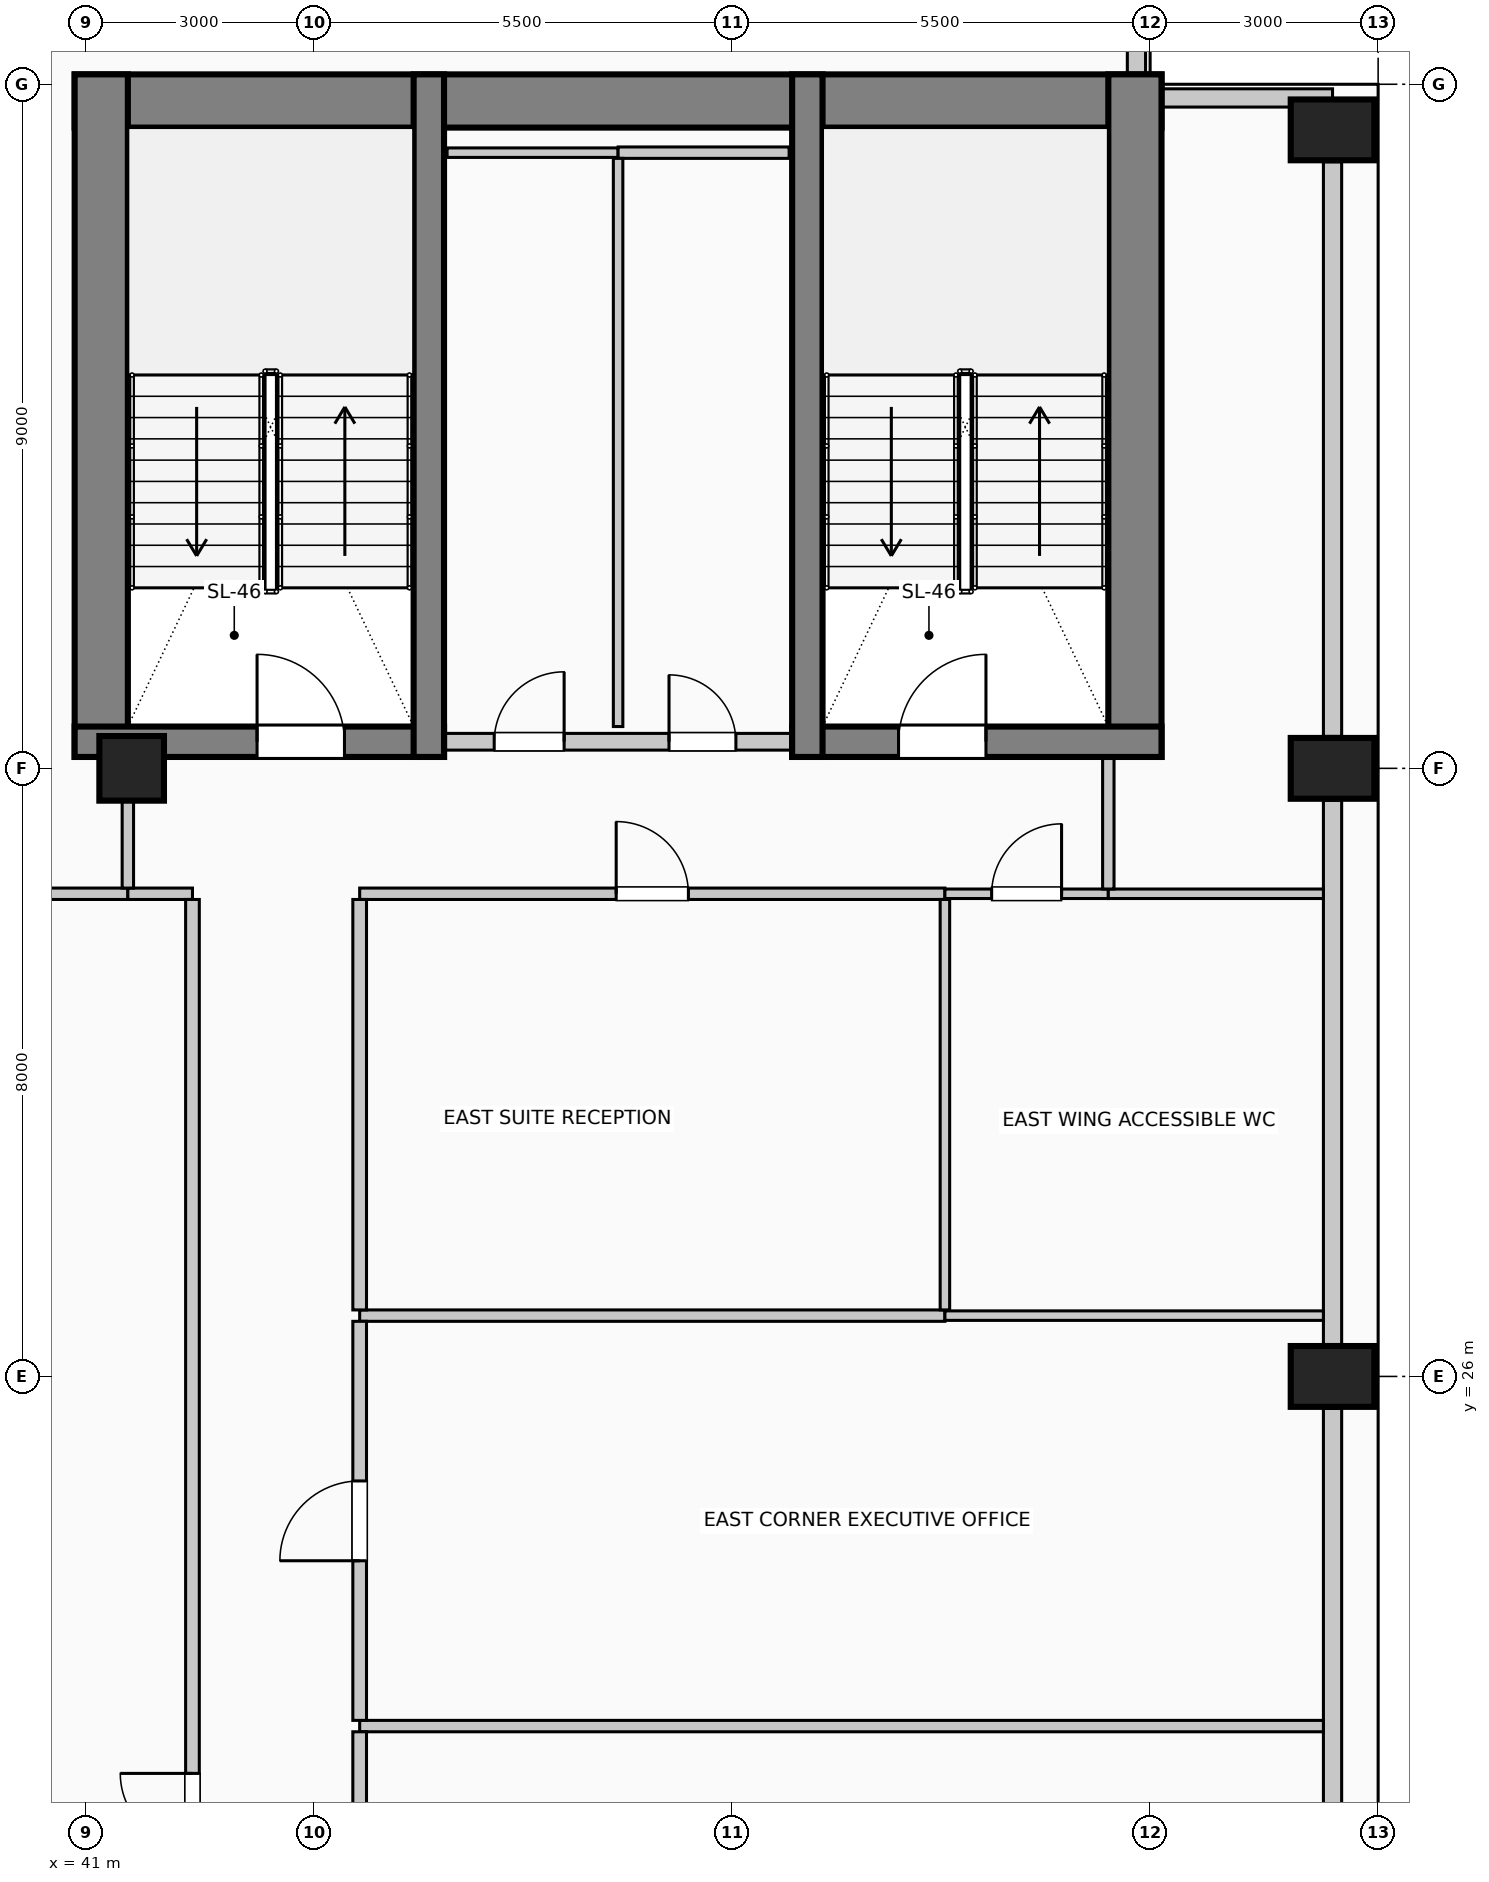
"""IFC4 building model, lengths in metres.
Left out: names, types, materials, properties, quantities, classifications, styles, units other than length and angle.
Written with IfcOpenShell. Run it as: python <this file> out.ifc"""

import sys

from ifc_helpers import new_model, si_unit, direction, frame, frame_2d, origin, origin_2d, place, context, subcontext, project, spatial, rectangle, circle, extrude, element, fill, save


model = new_model("IFC4")
c1 = context("Model", 3, precision=1e-05, world=origin(), true_north=direction((0.0, 1.0)))
c2 = subcontext(c1, "Body", "Model", "MODEL_VIEW")
j1 = project(units=[si_unit("LENGTHUNIT", "METRE"), si_unit("PLANEANGLEUNIT", "RADIAN")], contexts=[c1])
p1 = place(None, origin())
s1 = spatial("IfcSite", under=j1, at=p1, CompositionType="ELEMENT")
p2 = place(p1, origin())
s2 = spatial("IfcBuilding", under=s1, at=p2, CompositionType="ELEMENT")
p3 = place(p2, frame((0.0, 0.0, 186.6)))
s3 = spatial("IfcBuildingStorey", under=s2, at=p3, CompositionType="ELEMENT", Elevation=186.6)
p4 = place(p3, frame((40.85, 42.78, 0.0), z_axis=(0.0, 0.0, 1.0), x_axis=(1.0, 0.0, 0.0)))
e1 = element("IfcWall", 1, at=p4, inside=s3, PredefinedType="SHEAR", context=c2, shape_type="SweptSolid", body=[
    extrude(rectangle(XDim=14.3, YDim=0.7, at=frame_2d((7.15, 0.0))), origin(), (0.0, 0.0, 1.0), 4.0),
])
for number, where, z_axis, x_axis in (
    (2, (41.2, 34.15, 0.0), (0.0, 0.0, 1.0), (0.0, 1.0, 0.0)),
    (3, (54.8, 34.15, 0.0), (0.0, 0.0, 1.0), (0.0, 1.0, 0.0)),
):
    element("IfcWall", number, at=place(p3, frame(where, z_axis=z_axis, x_axis=x_axis)), inside=s3, PredefinedType="SHEAR", context=c2, shape_type="SweptSolid", body=[
        extrude(rectangle(XDim=8.98, YDim=0.7, at=frame_2d((4.49, 0.0))), origin(), (0.0, 0.0, 1.0), 4.0),
    ])
p5 = place(p3, frame((40.85, 34.35, 0.0), z_axis=(0.0, 0.0, 1.0), x_axis=(1.0, 0.0, 0.0)))
e4 = element("IfcWall", 4, at=p5, inside=s3, PredefinedType="SHEAR", context=c2, shape_type="SweptSolid", body=[
    extrude(rectangle(XDim=4.86, YDim=0.4, at=frame_2d((2.43, 0.0))), origin(), (0.0, 0.0, 1.0), 4.0),
])
p6 = place(p5, frame((2.4, 0.0, 0.0)))
e5 = element("IfcOpeningElement", 5, at=p6, cuts=e4, PredefinedType="OPENING", context=c2, shape_type="SweptSolid", body=[
    extrude(rectangle(XDim=1.15, YDim=2.2, at=frame_2d((0.575, 1.1))), frame((0.0, 0.21, 0.0), z_axis=(0.0, -1.0, 0.0), x_axis=(1.0, 0.0, 0.0)), (0.0, 0.0, 1.0), 0.42),
])
p7 = place(p3, frame((45.51, 34.15, 0.0), z_axis=(0.0, 0.0, 1.0), x_axis=(0.0, 1.0, 0.0)))
e6 = element("IfcWall", 6, at=p7, inside=s3, PredefinedType="SHEAR", context=c2, shape_type="SweptSolid", body=[
    extrude(rectangle(XDim=8.98, YDim=0.4, at=frame_2d((4.49, 0.0))), origin(), (0.0, 0.0, 1.0), 4.0),
])
p8 = place(p3, frame((50.29, 34.35, 0.0), z_axis=(0.0, 0.0, 1.0), x_axis=(1.0, 0.0, 0.0)))
e7 = element("IfcWall", 7, at=p8, inside=s3, PredefinedType="SHEAR", context=c2, shape_type="SweptSolid", body=[
    extrude(rectangle(XDim=4.86, YDim=0.4, at=frame_2d((2.43, 0.0))), origin(), (0.0, 0.0, 1.0), 4.0),
])
p9 = place(p8, frame((1.4, 0.0, 0.0)))
e8 = element("IfcOpeningElement", 8, at=p9, cuts=e7, PredefinedType="OPENING", context=c2, shape_type="SweptSolid", body=[
    extrude(rectangle(XDim=1.15, YDim=2.2, at=frame_2d((0.575, 1.1))), frame((0.0, 0.21, 0.0), z_axis=(0.0, -1.0, 0.0), x_axis=(1.0, 0.0, 0.0)), (0.0, 0.0, 1.0), 0.42),
])
p10 = place(p3, frame((50.49, 34.15, 0.0), z_axis=(0.0, 0.0, 1.0), x_axis=(0.0, 1.0, 0.0)))
e9 = element("IfcWall", 9, at=p10, inside=s3, PredefinedType="SHEAR", context=c2, shape_type="SweptSolid", body=[
    extrude(rectangle(XDim=8.98, YDim=0.4, at=frame_2d((4.49, 0.0))), origin(), (0.0, 0.0, 1.0), 4.0),
])
for number, where, z_axis, x_axis in (
    (10, (57.4, 26.0, 0.0), (0.0, 0.0, 1.0), (0.0, 1.0, 0.0)),
    (11, (57.4, 34.0, 0.0), (0.0, 0.0, 1.0), (0.0, 1.0, 0.0)),
    (12, (57.4, 42.4, 0.0), (0.0, 0.0, 1.0), (0.0, 1.0, 0.0)),
):
    element("IfcColumn", number, at=place(p3, frame(where, z_axis=z_axis, x_axis=x_axis)), inside=s3, PredefinedType="COLUMN", context=c2, shape_type="SweptSolid", body=[
        extrude(rectangle(XDim=0.8, YDim=1.1, at=origin_2d()), origin(), (0.0, 0.0, 1.0), 4.0),
    ])
p11 = place(p3, frame((41.6, 34.0, 0.0), z_axis=(0.0, 0.0, 1.0), x_axis=(1.0, 0.0, 0.0)))
e13 = element("IfcColumn", 13, at=p11, inside=s3, PredefinedType="COLUMN", context=c2, shape_type="SweptSolid", body=[
    extrude(circle(Radius=0.425, at=origin_2d()), origin(), (0.0, 0.0, 1.0), 4.0),
])
for number, where, z_axis, x_axis in (
    (14, (57.4, 25.58, 0.0), (0.0, 0.0, 1.0), (0.0, -1.0, 0.0)),
    (15, (57.4, 33.58, 0.0), (0.0, 0.0, 1.0), (0.0, -1.0, 0.0)),
):
    element("IfcWall", number, at=place(p3, frame(where, z_axis=z_axis, x_axis=x_axis)), inside=s3, PredefinedType="SOLIDWALL", context=c2, shape_type="SweptSolid", body=[
        extrude(rectangle(XDim=7.16, YDim=0.24, at=frame_2d((3.58, 0.0))), origin(), (0.0, 0.0, 1.0), 3.0),
    ])
p12 = place(p3, frame((57.4, 41.98, 0.0), z_axis=(0.0, 0.0, 1.0), x_axis=(0.0, -1.0, 0.0)))
e16 = element("IfcWall", 16, at=p12, inside=s3, PredefinedType="SOLIDWALL", context=c2, shape_type="SweptSolid", body=[
    extrude(rectangle(XDim=7.56, YDim=0.24, at=frame_2d((3.78, 0.0))), origin(), (0.0, 0.0, 1.0), 3.0),
])
p13 = place(p3, frame((54.82, 45.4, 0.0), z_axis=(0.0, 0.0, 1.0), x_axis=(0.0, -1.0, 0.0)))
e17 = element("IfcWall", 17, at=p13, inside=s3, PredefinedType="SOLIDWALL", context=c2, shape_type="SweptSolid", body=[
    extrude(rectangle(XDim=2.265, YDim=0.24, at=frame_2d((1.132, 0.0))), origin(), (0.0, 0.0, 1.0), 3.75),
])
p14 = place(p3, frame((55.155, 42.82, 0.0), z_axis=(0.0, 0.0, 1.0), x_axis=(1.0, 0.0, 0.0)))
e18 = element("IfcWall", 18, at=p14, inside=s3, PredefinedType="SOLIDWALL", context=c2, shape_type="SweptSolid", body=[
    extrude(rectangle(XDim=2.245, YDim=0.24, at=frame_2d((1.123, 0.0))), origin(), (0.0, 0.0, 1.0), 3.75),
])
p15 = place(p3, frame((45.72, 34.35, 0.0), z_axis=(0.0, 0.0, 1.0), x_axis=(1.0, 0.0, 0.0)))
e19 = element("IfcWall", 19, at=p15, inside=s3, PredefinedType="PARTITIONING", context=c2, shape_type="SweptSolid", body=[
    extrude(rectangle(XDim=4.56, YDim=0.22, at=frame_2d((2.28, 0.0))), origin(), (0.0, 0.0, 1.0), 3.75),
])
p16 = place(p15, frame((0.65, 0.0, 0.0)))
e20 = element("IfcOpeningElement", 20, at=p16, cuts=e19, PredefinedType="OPENING", context=c2, shape_type="SweptSolid", body=[
    extrude(rectangle(XDim=0.92, YDim=2.1, at=frame_2d((0.46, 1.05))), frame((0.0, 0.12, 0.0), z_axis=(0.0, -1.0, 0.0), x_axis=(1.0, 0.0, 0.0)), (0.0, 0.0, 1.0), 0.24),
])
p17 = place(p15, frame((2.95, 0.0, 0.0)))
e21 = element("IfcOpeningElement", 21, at=p17, cuts=e19, PredefinedType="OPENING", context=c2, shape_type="SweptSolid", body=[
    extrude(rectangle(XDim=0.88, YDim=2.1, at=frame_2d((0.44, 1.05))), frame((0.0, 0.12, 0.0), z_axis=(0.0, -1.0, 0.0), x_axis=(1.0, 0.0, 0.0)), (0.0, 0.0, 1.0), 0.24),
])
p18 = place(p3, frame((44.6, 21.4, 0.0), z_axis=(0.0, 0.0, 1.0), x_axis=(1.0, 0.0, 0.0)))
e22 = element("IfcWall", 22, at=p18, inside=s3, PredefinedType="PARTITIONING", context=c2, shape_type="SweptSolid", body=[
    extrude(rectangle(XDim=12.68, YDim=0.15, at=frame_2d((6.34, 0.0))), origin(), (0.0, 0.0, 1.0), 3.75),
])
p19 = place(p3, frame((44.6, 26.8, 0.0), z_axis=(0.0, 0.0, 1.0), x_axis=(1.0, 0.0, 0.0)))
e23 = element("IfcWall", 23, at=p19, inside=s3, PredefinedType="PARTITIONING", context=c2, shape_type="SweptSolid", body=[
    extrude(rectangle(XDim=7.7, YDim=0.15, at=frame_2d((3.85, 0.0))), origin(), (0.0, 0.0, 1.0), 3.75),
])
p20 = place(p3, frame((52.3, 26.8, 0.0), z_axis=(0.0, 0.0, 1.0), x_axis=(1.0, 0.0, 0.0)))
e24 = element("IfcWall", 24, at=p20, inside=s3, PredefinedType="PARTITIONING", context=c2, shape_type="SweptSolid", body=[
    extrude(rectangle(XDim=4.98, YDim=0.125, at=frame_2d((2.49, 0.0))), origin(), (0.0, 0.0, 1.0), 3.75),
])
p21 = place(p3, frame((34.12, 32.35, 0.0), z_axis=(0.0, 0.0, 1.0), x_axis=(1.0, 0.0, 0.0)))
e25 = element("IfcWall", 25, at=p21, inside=s3, PredefinedType="PARTITIONING", context=c2, shape_type="SweptSolid", body=[
    extrude(rectangle(XDim=7.43, YDim=0.15, at=frame_2d((3.715, 0.0))), origin(), (0.0, 0.0, 1.0), 3.75),
])
p22 = place(p3, frame((41.55, 32.35, 0.0), z_axis=(0.0, 0.0, 1.0), x_axis=(1.0, 0.0, 0.0)))
e26 = element("IfcWall", 26, at=p22, inside=s3, PredefinedType="PARTITIONING", context=c2, shape_type="SweptSolid", body=[
    extrude(rectangle(XDim=0.85, YDim=0.15, at=frame_2d((0.425, 0.0))), origin(), (0.0, 0.0, 1.0), 3.75),
])
p23 = place(p3, frame((44.6, 32.35, 0.0), z_axis=(0.0, 0.0, 1.0), x_axis=(1.0, 0.0, 0.0)))
e27 = element("IfcWall", 27, at=p23, inside=s3, PredefinedType="PARTITIONING", context=c2, shape_type="SweptSolid", body=[
    extrude(rectangle(XDim=7.7, YDim=0.15, at=frame_2d((3.85, 0.0))), origin(), (0.0, 0.0, 1.0), 3.75),
])
p24 = place(p23, frame((3.375, 0.0, 0.0)))
e28 = element("IfcOpeningElement", 28, at=p24, cuts=e27, PredefinedType="OPENING", context=c2, shape_type="SweptSolid", body=[
    extrude(rectangle(XDim=0.95, YDim=2.15, at=frame_2d((0.475, 1.075))), frame((0.0, 0.085, 0.0), z_axis=(0.0, -1.0, 0.0), x_axis=(1.0, 0.0, 0.0)), (0.0, 0.0, 1.0), 0.17),
])
p25 = place(p3, frame((52.3, 32.35, 0.0), z_axis=(0.0, 0.0, 1.0), x_axis=(1.0, 0.0, 0.0)))
e29 = element("IfcWall", 29, at=p25, inside=s3, PredefinedType="PARTITIONING", context=c2, shape_type="SweptSolid", body=[
    extrude(rectangle(XDim=2.15, YDim=0.125, at=frame_2d((1.075, 0.0))), origin(), (0.0, 0.0, 1.0), 3.75),
])
p26 = place(p25, frame((0.615, 0.0, 0.0)))
e30 = element("IfcOpeningElement", 30, at=p26, cuts=e29, PredefinedType="OPENING", context=c2, shape_type="SweptSolid", body=[
    extrude(rectangle(XDim=0.92, YDim=2.1, at=frame_2d((0.46, 1.05))), frame((0.0, 0.073, 0.0), z_axis=(0.0, -1.0, 0.0), x_axis=(1.0, 0.0, 0.0)), (0.0, 0.0, 1.0), 0.145),
])
p27 = place(p3, frame((54.45, 32.35, 0.0), z_axis=(0.0, 0.0, 1.0), x_axis=(1.0, 0.0, 0.0)))
e31 = element("IfcWall", 31, at=p27, inside=s3, PredefinedType="PARTITIONING", context=c2, shape_type="SweptSolid", body=[
    extrude(rectangle(XDim=2.83, YDim=0.125, at=frame_2d((1.415, 0.0))), origin(), (0.0, 0.0, 1.0), 3.75),
])
p28 = place(p3, frame((45.75, 42.1, 0.0), z_axis=(0.0, 0.0, 1.0), x_axis=(1.0, 0.0, 0.0)))
e32 = element("IfcWall", 32, at=p28, inside=s3, PredefinedType="PARTITIONING", context=c2, shape_type="SweptSolid", body=[
    extrude(rectangle(XDim=2.25, YDim=0.125, at=frame_2d((1.125, 0.0))), origin(), (0.0, 0.0, 1.0), 3.75),
])
p29 = place(p3, frame((48.0, 42.1, 0.0), z_axis=(0.0, 0.0, 1.0), x_axis=(1.0, 0.0, 0.0)))
e33 = element("IfcWall", 33, at=p29, inside=s3, PredefinedType="PARTITIONING", context=c2, shape_type="SweptSolid", body=[
    extrude(rectangle(XDim=2.25, YDim=0.15, at=frame_2d((1.125, 0.0))), origin(), (0.0, 0.0, 1.0), 3.75),
])
p30 = place(p3, frame((41.55, 32.425, 0.0), z_axis=(0.0, 0.0, 1.0), x_axis=(0.0, 1.0, 0.0)))
e34 = element("IfcWall", 34, at=p30, inside=s3, PredefinedType="PARTITIONING", context=c2, shape_type="SweptSolid", body=[
    extrude(rectangle(XDim=1.15, YDim=0.15, at=frame_2d((0.575, 0.0))), origin(), (0.0, 0.0, 1.0), 3.145),
])
p31 = place(p3, frame((42.4, 6.89, 0.0), z_axis=(0.0, 0.0, 1.0), x_axis=(0.0, 1.0, 0.0)))
e35 = element("IfcWall", 35, at=p31, inside=s3, PredefinedType="PARTITIONING", context=c2, shape_type="SweptSolid", body=[
    extrude(rectangle(XDim=25.385, YDim=0.18, at=frame_2d((12.692, 0.0))), origin(), (0.0, 0.0, 1.0), 3.75),
])
p32 = place(p31, frame((12.938, 0.0, 0.0)))
e36 = element("IfcOpeningElement", 36, at=p32, cuts=e35, PredefinedType="OPENING", context=c2, shape_type="SweptSolid", body=[
    extrude(rectangle(XDim=0.95, YDim=2.15, at=frame_2d((0.475, 1.075))), frame((0.0, 0.1, 0.0), z_axis=(0.0, -1.0, 0.0), x_axis=(1.0, 0.0, 0.0)), (0.0, 0.0, 1.0), 0.2),
])
p33 = place(p3, frame((44.6, 16.075, 0.0), z_axis=(0.0, 0.0, 1.0), x_axis=(0.0, 1.0, 0.0)))
e37 = element("IfcWall", 37, at=p33, inside=s3, PredefinedType="PARTITIONING", context=c2, shape_type="SweptSolid", body=[
    extrude(rectangle(XDim=5.25, YDim=0.18, at=frame_2d((2.625, 0.0))), origin(), (0.0, 0.0, 1.0), 3.75),
])
p34 = place(p33, frame((2.15, 0.0, 0.0)))
e38 = element("IfcOpeningElement", 38, at=p34, cuts=e37, PredefinedType="OPENING", context=c2, shape_type="SweptSolid", body=[
    extrude(rectangle(XDim=0.95, YDim=2.15, at=frame_2d((0.475, 1.075))), frame((0.0, 0.1, 0.0), z_axis=(0.0, -1.0, 0.0), x_axis=(1.0, 0.0, 0.0)), (0.0, 0.0, 1.0), 0.2),
])
p35 = place(p3, frame((44.6, 21.475, 0.0), z_axis=(0.0, 0.0, 1.0), x_axis=(0.0, 1.0, 0.0)))
e39 = element("IfcWall", 39, at=p35, inside=s3, PredefinedType="PARTITIONING", context=c2, shape_type="SweptSolid", body=[
    extrude(rectangle(XDim=5.25, YDim=0.18, at=frame_2d((2.625, 0.0))), origin(), (0.0, 0.0, 1.0), 3.75),
])
p36 = place(p35, frame((2.1, 0.0, 0.0)))
e40 = element("IfcOpeningElement", 40, at=p36, cuts=e39, PredefinedType="OPENING", context=c2, shape_type="SweptSolid", body=[
    extrude(rectangle(XDim=1.05, YDim=2.15, at=frame_2d((0.525, 1.075))), frame((0.0, 0.1, 0.0), z_axis=(0.0, -1.0, 0.0), x_axis=(1.0, 0.0, 0.0)), (0.0, 0.0, 1.0), 0.2),
])
p37 = place(p3, frame((44.6, 26.875, 0.0), z_axis=(0.0, 0.0, 1.0), x_axis=(0.0, 1.0, 0.0)))
e41 = element("IfcWall", 41, at=p37, inside=s3, PredefinedType="PARTITIONING", context=c2, shape_type="SweptSolid", body=[
    extrude(rectangle(XDim=5.4, YDim=0.18, at=frame_2d((2.7, 0.0))), origin(), (0.0, 0.0, 1.0), 3.75),
])
p38 = place(p3, frame((48.0, 34.55, 0.0), z_axis=(0.0, 0.0, 1.0), x_axis=(0.0, 1.0, 0.0)))
e42 = element("IfcWall", 42, at=p38, inside=s3, PredefinedType="PARTITIONING", context=c2, shape_type="SweptSolid", body=[
    extrude(rectangle(XDim=7.475, YDim=0.125, at=frame_2d((3.737, 0.0))), origin(), (0.0, 0.0, 1.0), 3.75),
])
p39 = place(p3, frame((52.3, 26.875, 0.0), z_axis=(0.0, 0.0, 1.0), x_axis=(0.0, 1.0, 0.0)))
e43 = element("IfcWall", 43, at=p39, inside=s3, PredefinedType="PARTITIONING", context=c2, shape_type="SweptSolid", body=[
    extrude(rectangle(XDim=5.4, YDim=0.125, at=frame_2d((2.7, 0.0))), origin(), (0.0, 0.0, 1.0), 3.75),
])
p40 = place(p3, frame((54.45, 32.413, 0.0), z_axis=(0.0, 0.0, 1.0), x_axis=(0.0, 1.0, 0.0)))
e44 = element("IfcWall", 44, at=p40, inside=s3, PredefinedType="PARTITIONING", context=c2, shape_type="SweptSolid", body=[
    extrude(rectangle(XDim=1.737, YDim=0.15, at=frame_2d((0.869, 0.0))), origin(), (0.0, 0.0, 1.0), 3.75),
])
p41 = place(p6, origin())
e45 = element("IfcDoor", 45, at=p41, inside=s3, OperationType="SINGLE_SWING_LEFT", PredefinedType="DOOR", context=c2, shape_type="SweptSolid", body=[
    extrude(rectangle(XDim=1.15, YDim=2.2, at=frame_2d((0.575, 1.1))), frame((0.0, 0.025, 0.0), z_axis=(0.0, -1.0, 0.0), x_axis=(1.0, 0.0, 0.0)), (0.0, 0.0, 1.0), 0.05),
])
fill(e5, e45)
p42 = place(p16, origin())
e46 = element("IfcDoor", 46, at=p42, inside=s3, OperationType="SINGLE_SWING_RIGHT", PredefinedType="DOOR", context=c2, shape_type="SweptSolid", body=[
    extrude(rectangle(XDim=0.92, YDim=2.1, at=frame_2d((0.46, 1.05))), frame((0.0, 0.025, 0.0), z_axis=(0.0, -1.0, 0.0), x_axis=(1.0, 0.0, 0.0)), (0.0, 0.0, 1.0), 0.05),
])
fill(e20, e46)
p43 = place(p17, origin())
e47 = element("IfcDoor", 47, at=p43, inside=s3, OperationType="SINGLE_SWING_LEFT", PredefinedType="DOOR", context=c2, shape_type="SweptSolid", body=[
    extrude(rectangle(XDim=0.88, YDim=2.1, at=frame_2d((0.44, 1.05))), frame((0.0, 0.025, 0.0), z_axis=(0.0, -1.0, 0.0), x_axis=(1.0, 0.0, 0.0)), (0.0, 0.0, 1.0), 0.05),
])
fill(e21, e47)
p44 = place(p9, origin())
e48 = element("IfcDoor", 48, at=p44, inside=s3, OperationType="SINGLE_SWING_RIGHT", PredefinedType="DOOR", context=c2, shape_type="SweptSolid", body=[
    extrude(rectangle(XDim=1.15, YDim=2.2, at=frame_2d((0.575, 1.1))), frame((0.0, 0.025, 0.0), z_axis=(0.0, -1.0, 0.0), x_axis=(1.0, 0.0, 0.0)), (0.0, 0.0, 1.0), 0.05),
])
fill(e8, e48)
p45 = place(p24, origin())
e49 = element("IfcDoor", 49, at=p45, inside=s3, OperationType="SINGLE_SWING_LEFT", PredefinedType="DOOR", context=c2, shape_type="SweptSolid", body=[
    extrude(rectangle(XDim=0.95, YDim=2.15, at=frame_2d((0.475, 1.075))), frame((0.0, 0.025, 0.0), z_axis=(0.0, -1.0, 0.0), x_axis=(1.0, 0.0, 0.0)), (0.0, 0.0, 1.0), 0.05),
])
fill(e28, e49)
p46 = place(p26, origin())
e50 = element("IfcDoor", 50, at=p46, inside=s3, OperationType="SINGLE_SWING_RIGHT", PredefinedType="DOOR", context=c2, shape_type="SweptSolid", body=[
    extrude(rectangle(XDim=0.92, YDim=2.1, at=frame_2d((0.46, 1.05))), frame((0.0, 0.025, 0.0), z_axis=(0.0, -1.0, 0.0), x_axis=(1.0, 0.0, 0.0)), (0.0, 0.0, 1.0), 0.05),
])
fill(e30, e50)
p47 = place(p32, origin())
e51 = element("IfcDoor", 51, at=p47, inside=s3, OperationType="SINGLE_SWING_RIGHT", PredefinedType="DOOR", context=c2, shape_type="SweptSolid", body=[
    extrude(rectangle(XDim=0.95, YDim=2.15, at=frame_2d((0.475, 1.075))), frame((0.0, 0.025, 0.0), z_axis=(0.0, -1.0, 0.0), x_axis=(1.0, 0.0, 0.0)), (0.0, 0.0, 1.0), 0.05),
])
fill(e36, e51)
p48 = place(p36, origin())
e52 = element("IfcDoor", 52, at=p48, inside=s3, OperationType="SINGLE_SWING_LEFT", PredefinedType="DOOR", context=c2, shape_type="SweptSolid", body=[
    extrude(rectangle(XDim=1.05, YDim=2.15, at=frame_2d((0.525, 1.075))), frame((0.0, 0.025, 0.0), z_axis=(0.0, -1.0, 0.0), x_axis=(1.0, 0.0, 0.0)), (0.0, 0.0, 1.0), 0.05),
])
fill(e40, e52)
save(model, sys.argv[1])
